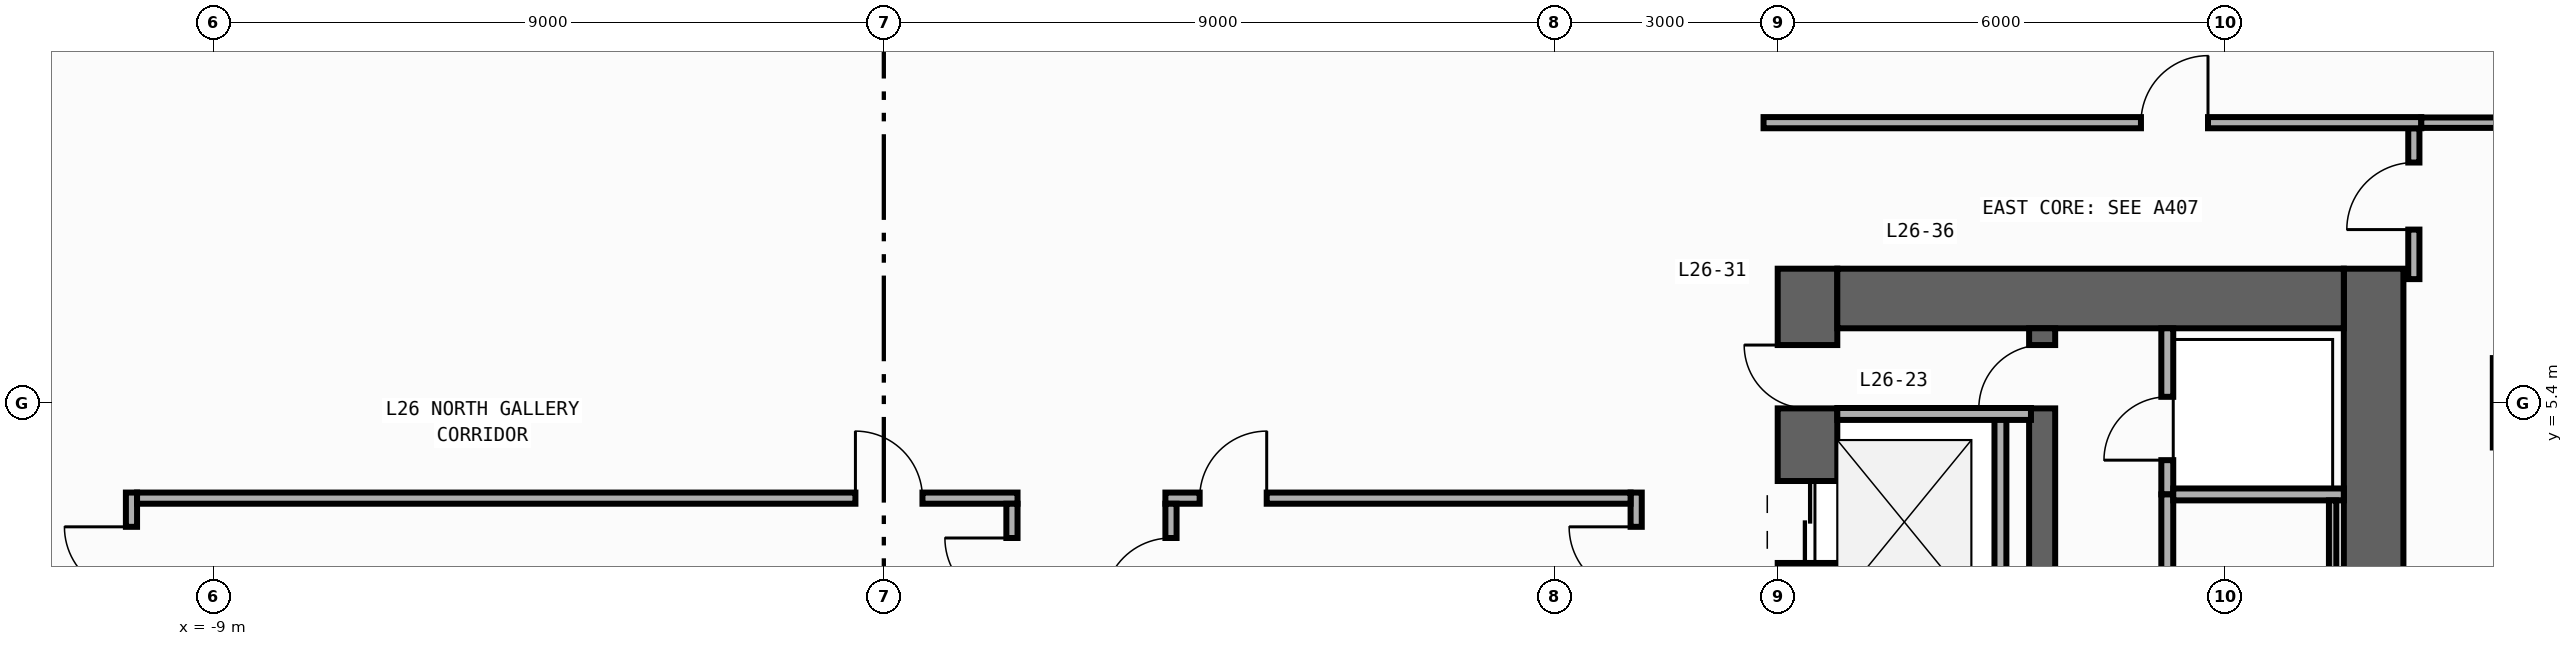
"""IFC4 building model, lengths in metres.
Left out: names, types, materials, properties, quantities, classifications, styles, units other than length and angle.
Written with IfcOpenShell. Run it as: python <this file> out.ifc"""

import sys

from ifc_helpers import new_model, si_unit, direction, frame, frame_2d, origin, origin_2d, place, context, subcontext, project, spatial, rectangle, extrude, element, fill, save


model = new_model("IFC4")
c1 = context("Model", 3, precision=1e-05, world=origin(), true_north=direction((0.0, 1.0)))
c2 = subcontext(c1, "Body", "Model", "MODEL_VIEW")
j1 = project(units=[si_unit("LENGTHUNIT", "METRE"), si_unit("PLANEANGLEUNIT", "RADIAN")], contexts=[c1])
p1 = place(None, origin())
s1 = spatial("IfcSite", under=j1, at=p1, CompositionType="ELEMENT")
p2 = place(p1, origin())
s2 = spatial("IfcBuilding", under=s1, at=p2, CompositionType="ELEMENT")
p3 = place(p2, frame((0.0, 0.0, 114.2)))
s3 = spatial("IfcBuildingStorey", under=s2, at=p3, CompositionType="ELEMENT", Elevation=114.2)
p4 = place(p3, frame((12.4, -19.8, 0.0), z_axis=(0.0, 0.0, 1.0), x_axis=(0.0, 1.0, 0.0)))
e1 = element("IfcWall", 1, at=p4, inside=s3, PredefinedType="SHEAR", context=c2, shape_type="SweptSolid", body=[
    extrude(rectangle(XDim=27.0, YDim=0.8, at=frame_2d((13.5, 0.0))), origin(), (0.0, 0.0, 1.0), 3.94),
])
p5 = place(p4, frame((23.05, 0.0, 0.0)))
e2 = element("IfcOpeningElement", 2, at=p5, cuts=e1, PredefinedType="OPENING", context=c2, shape_type="SweptSolid", body=[
    extrude(rectangle(XDim=1.1, YDim=2.2, at=frame_2d((0.55, 1.1))), frame((0.0, 0.41, 0.0), z_axis=(0.0, -1.0, 0.0), x_axis=(1.0, 0.0, 0.0)), (0.0, 0.0, 1.0), 0.82),
])
p6 = place(p4, frame((19.85, 0.0, 0.0)))
e3 = element("IfcOpeningElement", 3, at=p6, cuts=e1, PredefinedType="OPENING", context=c2, shape_type="SweptSolid", body=[
    extrude(rectangle(XDim=1.1, YDim=2.2, at=frame_2d((0.55, 1.1))), frame((0.0, 0.41, 0.0), z_axis=(0.0, -1.0, 0.0), x_axis=(1.0, 0.0, 0.0)), (0.0, 0.0, 1.0), 0.82),
])
p7 = place(p4, frame((16.65, 0.0, 0.0)))
e4 = element("IfcOpeningElement", 4, at=p7, cuts=e1, PredefinedType="OPENING", context=c2, shape_type="SweptSolid", body=[
    extrude(rectangle(XDim=1.1, YDim=2.2, at=frame_2d((0.55, 1.1))), frame((0.0, 0.41, 0.0), z_axis=(0.0, -1.0, 0.0), x_axis=(1.0, 0.0, 0.0)), (0.0, 0.0, 1.0), 0.82),
])
p8 = place(p4, frame((6.275, 0.0, 0.0)))
e5 = element("IfcOpeningElement", 5, at=p8, cuts=e1, PredefinedType="OPENING", context=c2, shape_type="SweptSolid", body=[
    extrude(rectangle(XDim=0.85, YDim=2.1, at=frame_2d((0.425, 1.05))), frame((0.0, 0.41, 0.0), z_axis=(0.0, -1.0, 0.0), x_axis=(1.0, 0.0, 0.0)), (0.0, 0.0, 1.0), 0.82),
])
p9 = place(p4, frame((8.575, 0.0, 0.0)))
e6 = element("IfcOpeningElement", 6, at=p9, cuts=e1, PredefinedType="OPENING", context=c2, shape_type="SweptSolid", body=[
    extrude(rectangle(XDim=0.85, YDim=2.1, at=frame_2d((0.425, 1.05))), frame((0.0, 0.41, 0.0), z_axis=(0.0, -1.0, 0.0), x_axis=(1.0, 0.0, 0.0)), (0.0, 0.0, 1.0), 0.82),
])
p10 = place(p4, frame((10.675, 0.0, 0.0)))
e7 = element("IfcOpeningElement", 7, at=p10, cuts=e1, PredefinedType="OPENING", context=c2, shape_type="SweptSolid", body=[
    extrude(rectangle(XDim=0.85, YDim=2.1, at=frame_2d((0.425, 1.05))), frame((0.0, 0.41, 0.0), z_axis=(0.0, -1.0, 0.0), x_axis=(1.0, 0.0, 0.0)), (0.0, 0.0, 1.0), 0.82),
])
p11 = place(p4, frame((12.725, 0.0, 0.0)))
e8 = element("IfcOpeningElement", 8, at=p11, cuts=e1, PredefinedType="OPENING", context=c2, shape_type="SweptSolid", body=[
    extrude(rectangle(XDim=1.15, YDim=2.2, at=frame_2d((0.575, 1.1))), frame((0.0, 0.41, 0.0), z_axis=(0.0, -1.0, 0.0), x_axis=(1.0, 0.0, 0.0)), (0.0, 0.0, 1.0), 0.82),
])
p12 = place(p4, frame((25.125, 0.0, 0.0)))
e9 = element("IfcOpeningElement", 9, at=p12, cuts=e1, PredefinedType="OPENING", context=c2, shape_type="SweptSolid", body=[
    extrude(rectangle(XDim=0.85, YDim=2.1, at=frame_2d((0.425, 1.05))), frame((0.0, 0.41, 0.0), z_axis=(0.0, -1.0, 0.0), x_axis=(1.0, 0.0, 0.0)), (0.0, 0.0, 1.0), 0.82),
])
p13 = place(p3, frame((20.0, -19.8, 0.0), z_axis=(0.0, 0.0, 1.0), x_axis=(0.0, 1.0, 0.0)))
e10 = element("IfcWall", 10, at=p13, inside=s3, PredefinedType="SHEAR", context=c2, shape_type="SweptSolid", body=[
    extrude(rectangle(XDim=27.0, YDim=0.8, at=frame_2d((13.5, 0.0))), origin(), (0.0, 0.0, 1.0), 3.94),
])
p14 = place(p3, frame((12.8, 6.8, 0.0), z_axis=(0.0, 0.0, 1.0), x_axis=(1.0, 0.0, 0.0)))
e11 = element("IfcWall", 11, at=p14, inside=s3, PredefinedType="SHEAR", context=c2, shape_type="SweptSolid", body=[
    extrude(rectangle(XDim=6.8, YDim=0.8, at=frame_2d((3.4, 0.0))), origin(), (0.0, 0.0, 1.0), 3.94),
])
p15 = place(p3, frame((15.55, -19.0, 0.0), z_axis=(0.0, 0.0, 1.0), x_axis=(0.0, 1.0, 0.0)))
e12 = element("IfcWall", 12, at=p15, inside=s3, PredefinedType="SHEAR", context=c2, shape_type="SweptSolid", body=[
    extrude(rectangle(XDim=25.4, YDim=0.35, at=frame_2d((12.7, 0.0))), origin(), (0.0, 0.0, 1.0), 3.94),
])
p16 = place(p15, frame((11.925, 0.0, 0.0)))
e13 = element("IfcOpeningElement", 13, at=p16, cuts=e12, PredefinedType="OPENING", context=c2, shape_type="SweptSolid", body=[
    extrude(rectangle(XDim=1.15, YDim=2.2, at=frame_2d((0.575, 1.1))), frame((0.0, 0.185, 0.0), z_axis=(0.0, -1.0, 0.0), x_axis=(1.0, 0.0, 0.0)), (0.0, 0.0, 1.0), 0.37),
])
p17 = place(p15, frame((24.325, 0.0, 0.0)))
e14 = element("IfcOpeningElement", 14, at=p17, cuts=e12, PredefinedType="OPENING", context=c2, shape_type="SweptSolid", body=[
    extrude(rectangle(XDim=0.85, YDim=2.1, at=frame_2d((0.425, 1.05))), frame((0.0, 0.185, 0.0), z_axis=(0.0, -1.0, 0.0), x_axis=(1.0, 0.0, 0.0)), (0.0, 0.0, 1.0), 0.37),
])
p18 = place(p3, frame((22.2, 5.4, 0.0), z_axis=(0.0, 0.0, 1.0), x_axis=(1.0, 0.0, 0.0)))
e15 = element("IfcColumn", 15, at=p18, inside=s3, PredefinedType="COLUMN", context=c2, shape_type="SweptSolid", body=[
    extrude(rectangle(XDim=1.2, YDim=1.2, at=origin_2d()), origin(), (0.0, 0.0, 1.0), 4.2),
])
p19 = place(p3, frame((14.99, 2.4, 0.0), z_axis=(0.0, 0.0, 1.0), x_axis=(0.0, 1.0, 0.0)))
e16 = element("IfcWall", 16, at=p19, inside=s3, PredefinedType="STANDARD", context=c2, shape_type="SweptSolid", body=[
    extrude(rectangle(XDim=2.8, YDim=0.16, at=frame_2d((1.4, 0.0))), origin(), (0.0, 0.0, 1.0), 3.94),
])
p20 = place(p3, frame((12.8, 5.25, 0.0), z_axis=(0.0, 0.0, 1.0), x_axis=(1.0, 0.0, 0.0)))
e17 = element("IfcWall", 17, at=p20, inside=s3, PredefinedType="STANDARD", context=c2, shape_type="SweptSolid", body=[
    extrude(rectangle(XDim=2.6, YDim=0.16, at=frame_2d((1.3, 0.0))), origin(), (0.0, 0.0, 1.0), 3.94),
])
p21 = place(p3, frame((17.23, 4.17, 0.0), z_axis=(0.0, 0.0, 1.0), x_axis=(0.0, 1.0, 0.0)))
e18 = element("IfcWall", 18, at=p21, inside=s3, PredefinedType="PARTITIONING", context=c2, shape_type="SweptSolid", body=[
    extrude(rectangle(XDim=2.23, YDim=0.16, at=frame_2d((1.115, 0.0))), origin(), (0.0, 0.0, 1.0), 3.94),
])
p22 = place(p21, frame((0.46, 0.0, 0.0)))
e19 = element("IfcOpeningElement", 19, at=p22, cuts=e18, PredefinedType="OPENING", context=c2, shape_type="SweptSolid", body=[
    extrude(rectangle(XDim=0.85, YDim=2.1, at=frame_2d((0.425, 1.05))), frame((0.0, 0.09, 0.0), z_axis=(0.0, -1.0, 0.0), x_axis=(1.0, 0.0, 0.0)), (0.0, 0.0, 1.0), 0.18),
])
p23 = place(p3, frame((17.23, 1.03, 0.0), z_axis=(0.0, 0.0, 1.0), x_axis=(0.0, 1.0, 0.0)))
e20 = element("IfcWall", 20, at=p23, inside=s3, PredefinedType="PARTITIONING", context=c2, shape_type="SweptSolid", body=[
    extrude(rectangle(XDim=3.14, YDim=0.16, at=frame_2d((1.57, 0.0))), origin(), (0.0, 0.0, 1.0), 3.94),
])
p24 = place(p23, frame((1.145, 0.0, 0.0)))
e21 = element("IfcOpeningElement", 21, at=p24, cuts=e20, PredefinedType="OPENING", context=c2, shape_type="SweptSolid", body=[
    extrude(rectangle(XDim=0.85, YDim=2.1, at=frame_2d((0.425, 1.05))), frame((0.0, 0.09, 0.0), z_axis=(0.0, -1.0, 0.0), x_axis=(1.0, 0.0, 0.0)), (0.0, 0.0, 1.0), 0.18),
])
p25 = place(p3, frame((17.31, 4.17, 0.0), z_axis=(0.0, 0.0, 1.0), x_axis=(1.0, 0.0, 0.0)))
e22 = element("IfcWall", 22, at=p25, inside=s3, PredefinedType="PARTITIONING", context=c2, shape_type="SweptSolid", body=[
    extrude(rectangle(XDim=2.29, YDim=0.16, at=frame_2d((1.145, 0.0))), origin(), (0.0, 0.0, 1.0), 3.94),
])
p26 = place(p3, frame((-10.1, -0.92, 0.0), z_axis=(0.0, 0.0, 1.0), x_axis=(0.0, 1.0, 0.0)))
e23 = element("IfcWall", 23, at=p26, inside=s3, PredefinedType="PARTITIONING", context=c2, shape_type="SweptSolid", body=[
    extrude(rectangle(XDim=5.115, YDim=0.15, at=frame_2d((2.558, 0.0))), origin(), (0.0, 0.0, 1.0), 3.94),
])
p27 = place(p26, frame((3.755, 0.0, 0.0)))
e24 = element("IfcOpeningElement", 24, at=p27, cuts=e23, PredefinedType="OPENING", context=c2, shape_type="SweptSolid", body=[
    extrude(rectangle(XDim=0.9, YDim=2.15, at=frame_2d((0.45, 1.075))), frame((0.0, 0.085, 0.0), z_axis=(0.0, -1.0, 0.0), x_axis=(1.0, 0.0, 0.0)), (0.0, 0.0, 1.0), 0.17),
])
p28 = place(p3, frame((10.1, -2.38, 0.0), z_axis=(0.0, 0.0, 1.0), x_axis=(0.0, 1.0, 0.0)))
e25 = element("IfcWall", 25, at=p28, inside=s3, PredefinedType="PARTITIONING", context=c2, shape_type="SweptSolid", body=[
    extrude(rectangle(XDim=6.575, YDim=0.15, at=frame_2d((3.288, 0.0))), origin(), (0.0, 0.0, 1.0), 3.94),
])
p29 = place(p28, frame((5.215, 0.0, 0.0)))
e26 = element("IfcOpeningElement", 26, at=p29, cuts=e25, PredefinedType="OPENING", context=c2, shape_type="SweptSolid", body=[
    extrude(rectangle(XDim=0.9, YDim=2.15, at=frame_2d((0.45, 1.075))), frame((0.0, 0.085, 0.0), z_axis=(0.0, -1.0, 0.0), x_axis=(1.0, 0.0, 0.0)), (0.0, 0.0, 1.0), 0.17),
])
p30 = place(p3, frame((3.78, 4.12, 0.0), z_axis=(0.0, 0.0, 1.0), x_axis=(1.0, 0.0, 0.0)))
e27 = element("IfcWall", 27, at=p30, inside=s3, PredefinedType="PARTITIONING", context=c2, shape_type="SweptSolid", body=[
    extrude(rectangle(XDim=6.245, YDim=0.15, at=frame_2d((3.123, 0.0))), origin(), (0.0, 0.0, 1.0), 3.94),
])
p31 = place(p30, frame((0.46, 0.0, 0.0)))
e28 = element("IfcOpeningElement", 28, at=p31, cuts=e27, PredefinedType="OPENING", context=c2, shape_type="SweptSolid", body=[
    extrude(rectangle(XDim=0.9, YDim=2.15, at=frame_2d((0.45, 1.075))), frame((0.0, 0.085, 0.0), z_axis=(0.0, -1.0, 0.0), x_axis=(1.0, 0.0, 0.0)), (0.0, 0.0, 1.0), 0.17),
])
p32 = place(p3, frame((-10.025, 4.12, 0.0), z_axis=(0.0, 0.0, 1.0), x_axis=(1.0, 0.0, 0.0)))
e29 = element("IfcWall", 29, at=p32, inside=s3, PredefinedType="PARTITIONING", context=c2, shape_type="SweptSolid", body=[
    extrude(rectangle(XDim=11.82, YDim=0.15, at=frame_2d((5.91, 0.0))), origin(), (0.0, 0.0, 1.0), 3.94),
])
p33 = place(p32, frame((9.644, 0.0, 0.0)))
e30 = element("IfcOpeningElement", 30, at=p33, cuts=e29, PredefinedType="OPENING", context=c2, shape_type="SweptSolid", body=[
    extrude(rectangle(XDim=0.9, YDim=2.15, at=frame_2d((0.45, 1.075))), frame((0.0, 0.085, 0.0), z_axis=(0.0, -1.0, 0.0), x_axis=(1.0, 0.0, 0.0)), (0.0, 0.0, 1.0), 0.17),
])
p34 = place(p3, frame((3.855, -2.22, 0.0), z_axis=(0.0, 0.0, 1.0), x_axis=(0.0, 1.0, 0.0)))
e31 = element("IfcWall", 31, at=p34, inside=s3, PredefinedType="PARTITIONING", context=c2, shape_type="SweptSolid", body=[
    extrude(rectangle(XDim=6.265, YDim=0.15, at=frame_2d((3.132, 0.0))), origin(), (0.0, 0.0, 1.0), 3.94),
])
p35 = place(p34, frame((4.905, 0.0, 0.0)))
e32 = element("IfcOpeningElement", 32, at=p35, cuts=e31, PredefinedType="OPENING", context=c2, shape_type="SweptSolid", body=[
    extrude(rectangle(XDim=0.9, YDim=2.15, at=frame_2d((0.45, 1.075))), frame((0.0, 0.085, 0.0), z_axis=(0.0, -1.0, 0.0), x_axis=(1.0, 0.0, 0.0)), (0.0, 0.0, 1.0), 0.17),
])
p36 = place(p3, frame((1.72, -1.08, 0.0), z_axis=(0.0, 0.0, 1.0), x_axis=(0.0, 1.0, 0.0)))
e33 = element("IfcWall", 33, at=p36, inside=s3, PredefinedType="PARTITIONING", context=c2, shape_type="SweptSolid", body=[
    extrude(rectangle(XDim=5.125, YDim=0.15, at=frame_2d((2.562, 0.0))), origin(), (0.0, 0.0, 1.0), 3.94),
])
p37 = place(p36, frame((3.765, 0.0, 0.0)))
e34 = element("IfcOpeningElement", 34, at=p37, cuts=e33, PredefinedType="OPENING", context=c2, shape_type="SweptSolid", body=[
    extrude(rectangle(XDim=0.9, YDim=2.15, at=frame_2d((0.45, 1.075))), frame((0.0, 0.085, 0.0), z_axis=(0.0, -1.0, 0.0), x_axis=(1.0, 0.0, 0.0)), (0.0, 0.0, 1.0), 0.17),
])
p38 = place(p3, frame((20.54, 7.06, 0.0), z_axis=(0.0, 0.0, 1.0), x_axis=(0.0, 1.0, 0.0)))
e35 = element("IfcWall", 35, at=p38, inside=s3, PredefinedType="PARTITIONING", context=c2, shape_type="SweptSolid", body=[
    extrude(rectangle(XDim=2.025, YDim=0.15, at=frame_2d((1.012, 0.0))), origin(), (0.0, 0.0, 1.0), 3.94),
])
p39 = place(p38, frame((0.665, 0.0, 0.0)))
e36 = element("IfcOpeningElement", 36, at=p39, cuts=e35, PredefinedType="OPENING", context=c2, shape_type="SweptSolid", body=[
    extrude(rectangle(XDim=0.9, YDim=2.15, at=frame_2d((0.45, 1.075))), frame((0.0, 0.085, 0.0), z_axis=(0.0, -1.0, 0.0), x_axis=(1.0, 0.0, 0.0)), (0.0, 0.0, 1.0), 0.17),
])
p40 = place(p3, frame((11.81, 9.16, 0.0), z_axis=(0.0, 0.0, 1.0), x_axis=(1.0, 0.0, 0.0)))
e37 = element("IfcWall", 37, at=p40, inside=s3, PredefinedType="PARTITIONING", context=c2, shape_type="SweptSolid", body=[
    extrude(rectangle(XDim=8.83, YDim=0.15, at=frame_2d((4.415, 0.0))), origin(), (0.0, 0.0, 1.0), 3.94),
])
p41 = place(p40, frame((5.067, 0.0, 0.0)))
e38 = element("IfcOpeningElement", 38, at=p41, cuts=e37, PredefinedType="OPENING", context=c2, shape_type="SweptSolid", body=[
    extrude(rectangle(XDim=0.9, YDim=2.15, at=frame_2d((0.45, 1.075))), frame((0.0, 0.085, 0.0), z_axis=(0.0, -1.0, 0.0), x_axis=(1.0, 0.0, 0.0)), (0.0, 0.0, 1.0), 0.17),
])
p42 = place(p3, frame((20.64, 9.16, 0.0), z_axis=(0.0, 0.0, 1.0), x_axis=(1.0, 0.0, 0.0)))
e39 = element("IfcWall", 39, at=p42, inside=s3, PredefinedType="PARTITIONING", context=c2, shape_type="SweptSolid", body=[
    extrude(rectangle(XDim=2.815, YDim=0.14, at=frame_2d((1.408, 0.0))), origin(), (0.0, 0.0, 1.0), 3.94),
])
p43 = place(p3, frame((19.45, 4.09, 0.0), z_axis=(0.0, 0.0, 1.0), x_axis=(0.0, -1.0, 0.0)))
e40 = element("IfcWall", 40, at=p43, inside=s3, PredefinedType="PARTITIONING", context=c2, shape_type="SweptSolid", body=[
    extrude(rectangle(XDim=2.98, YDim=0.1, at=frame_2d((1.49, 0.0))), origin(), (0.0, 0.0, 1.0), 3.94),
])
p44 = place(p5, origin())
e41 = element("IfcDoor", 41, at=p44, inside=s3, OperationType="DOUBLE_DOOR_SLIDING", PredefinedType="DOOR", context=c2, shape_type="SweptSolid", body=[
    extrude(rectangle(XDim=1.1, YDim=2.2, at=frame_2d((0.55, 1.1))), frame((0.0, 0.025, 0.0), z_axis=(0.0, -1.0, 0.0), x_axis=(1.0, 0.0, 0.0)), (0.0, 0.0, 1.0), 0.05),
])
fill(e2, e41)
p45 = place(p12, origin())
e42 = element("IfcDoor", 42, at=p45, inside=s3, OperationType="SINGLE_SWING_RIGHT", PredefinedType="DOOR", context=c2, shape_type="SweptSolid", body=[
    extrude(rectangle(XDim=0.85, YDim=2.1, at=frame_2d((0.425, 1.05))), frame((0.0, 0.025, 0.0), z_axis=(0.0, -1.0, 0.0), x_axis=(1.0, 0.0, 0.0)), (0.0, 0.0, 1.0), 0.05),
])
fill(e9, e42)
p46 = place(p17, origin())
e43 = element("IfcDoor", 43, at=p46, inside=s3, OperationType="SINGLE_SWING_LEFT", PredefinedType="DOOR", context=c2, shape_type="SweptSolid", body=[
    extrude(rectangle(XDim=0.85, YDim=2.1, at=frame_2d((0.425, 1.05))), frame((0.0, 0.025, 0.0), z_axis=(0.0, -1.0, 0.0), x_axis=(1.0, 0.0, 0.0)), (0.0, 0.0, 1.0), 0.05),
])
fill(e14, e43)
p47 = place(p22, origin())
e44 = element("IfcDoor", 44, at=p47, inside=s3, OperationType="SINGLE_SWING_LEFT", PredefinedType="DOOR", context=c2, shape_type="SweptSolid", body=[
    extrude(rectangle(XDim=0.85, YDim=2.1, at=frame_2d((0.425, 1.05))), frame((0.0, 0.025, 0.0), z_axis=(0.0, -1.0, 0.0), x_axis=(1.0, 0.0, 0.0)), (0.0, 0.0, 1.0), 0.05),
])
fill(e19, e44)
p48 = place(p27, origin())
e45 = element("IfcDoor", 45, at=p48, inside=s3, OperationType="SINGLE_SWING_RIGHT", PredefinedType="DOOR", context=c2, shape_type="SweptSolid", body=[
    extrude(rectangle(XDim=0.9, YDim=2.15, at=frame_2d((0.45, 1.075))), frame((0.0, 0.025, 0.0), z_axis=(0.0, -1.0, 0.0), x_axis=(1.0, 0.0, 0.0)), (0.0, 0.0, 1.0), 0.05),
])
fill(e24, e45)
p49 = place(p29, origin())
e46 = element("IfcDoor", 46, at=p49, inside=s3, OperationType="SINGLE_SWING_RIGHT", PredefinedType="DOOR", context=c2, shape_type="SweptSolid", body=[
    extrude(rectangle(XDim=0.9, YDim=2.15, at=frame_2d((0.45, 1.075))), frame((0.0, 0.025, 0.0), z_axis=(0.0, -1.0, 0.0), x_axis=(1.0, 0.0, 0.0)), (0.0, 0.0, 1.0), 0.05),
])
fill(e26, e46)
p50 = place(p31, origin())
e47 = element("IfcDoor", 47, at=p50, inside=s3, OperationType="SINGLE_SWING_RIGHT", PredefinedType="DOOR", context=c2, shape_type="SweptSolid", body=[
    extrude(rectangle(XDim=0.9, YDim=2.15, at=frame_2d((0.45, 1.075))), frame((0.0, 0.025, 0.0), z_axis=(0.0, -1.0, 0.0), x_axis=(1.0, 0.0, 0.0)), (0.0, 0.0, 1.0), 0.05),
])
fill(e28, e47)
p51 = place(p33, origin())
e48 = element("IfcDoor", 48, at=p51, inside=s3, OperationType="SINGLE_SWING_LEFT", PredefinedType="DOOR", context=c2, shape_type="SweptSolid", body=[
    extrude(rectangle(XDim=0.9, YDim=2.15, at=frame_2d((0.45, 1.075))), frame((0.0, 0.025, 0.0), z_axis=(0.0, -1.0, 0.0), x_axis=(1.0, 0.0, 0.0)), (0.0, 0.0, 1.0), 0.05),
])
fill(e30, e48)
p52 = place(p35, origin())
e49 = element("IfcDoor", 49, at=p52, inside=s3, OperationType="SINGLE_SWING_LEFT", PredefinedType="DOOR", context=c2, shape_type="SweptSolid", body=[
    extrude(rectangle(XDim=0.9, YDim=2.15, at=frame_2d((0.45, 1.075))), frame((0.0, 0.025, 0.0), z_axis=(0.0, -1.0, 0.0), x_axis=(1.0, 0.0, 0.0)), (0.0, 0.0, 1.0), 0.05),
])
fill(e32, e49)
p53 = place(p37, origin())
e50 = element("IfcDoor", 50, at=p53, inside=s3, OperationType="SINGLE_SWING_RIGHT", PredefinedType="DOOR", context=c2, shape_type="SweptSolid", body=[
    extrude(rectangle(XDim=0.9, YDim=2.15, at=frame_2d((0.45, 1.075))), frame((0.0, 0.025, 0.0), z_axis=(0.0, -1.0, 0.0), x_axis=(1.0, 0.0, 0.0)), (0.0, 0.0, 1.0), 0.05),
])
fill(e34, e50)
p54 = place(p39, origin())
e51 = element("IfcDoor", 51, at=p54, inside=s3, OperationType="SINGLE_SWING_LEFT", PredefinedType="DOOR", context=c2, shape_type="SweptSolid", body=[
    extrude(rectangle(XDim=0.9, YDim=2.15, at=frame_2d((0.45, 1.075))), frame((0.0, 0.025, 0.0), z_axis=(0.0, -1.0, 0.0), x_axis=(1.0, 0.0, 0.0)), (0.0, 0.0, 1.0), 0.05),
])
fill(e36, e51)
p55 = place(p41, origin())
e52 = element("IfcDoor", 52, at=p55, inside=s3, OperationType="SINGLE_SWING_RIGHT", PredefinedType="DOOR", context=c2, shape_type="SweptSolid", body=[
    extrude(rectangle(XDim=0.9, YDim=2.15, at=frame_2d((0.45, 1.075))), frame((0.0, 0.025, 0.0), z_axis=(0.0, -1.0, 0.0), x_axis=(1.0, 0.0, 0.0)), (0.0, 0.0, 1.0), 0.05),
])
fill(e38, e52)
save(model, sys.argv[1])
